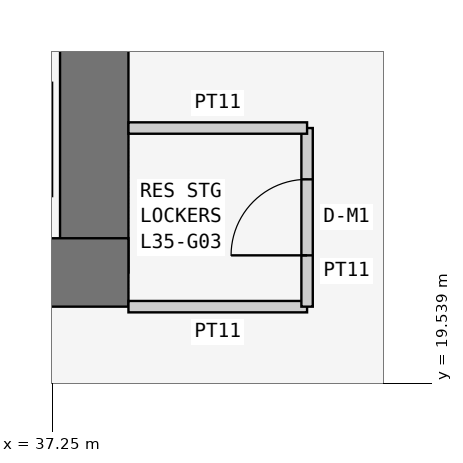
"""IFC4 building model, lengths in metres.
Left out: names, types, materials, properties, quantities, classifications, styles, units other than length and angle.
Written with IfcOpenShell. Run it as: python <this file> out.ifc"""

import sys

from ifc_helpers import new_model, si_unit, direction, frame, frame_2d, origin, place, context, subcontext, project, spatial, rectangle, extrude, element, fill, save


model = new_model("IFC4")
c1 = context("Model", 3, precision=1e-05, world=origin(), true_north=direction((0.0, 1.0)))
c2 = subcontext(c1, "Body", "Model", "MODEL_VIEW")
j1 = project(units=[si_unit("LENGTHUNIT", "METRE"), si_unit("PLANEANGLEUNIT", "RADIAN")], contexts=[c1])
p1 = place(None, origin())
s1 = spatial("IfcSite", under=j1, at=p1, CompositionType="ELEMENT")
p2 = place(p1, origin())
s2 = spatial("IfcBuilding", under=s1, at=p2, CompositionType="ELEMENT")
p3 = place(p2, frame((0.0, 0.0, 137.7)))
s3 = spatial("IfcBuildingStorey", under=s2, at=p3, CompositionType="ELEMENT", Elevation=137.7)
p4 = place(p3, frame((21.0, 21.0, 0.0), z_axis=(0.0, 0.0, 1.0), x_axis=(1.0, 0.0, 0.0)))
e1 = element("IfcWall", 1, at=p4, inside=s3, PredefinedType="SHEAR", context=c2, shape_type="SweptSolid", body=[
    extrude(rectangle(XDim=17.25, YDim=0.9, at=frame_2d((8.625, 0.0))), origin(), (0.0, 0.0, 1.0), 3.6),
])
p5 = place(p3, frame((37.8, 21.0, 0.0), z_axis=(0.0, 0.0, 1.0), x_axis=(0.0, 1.0, 0.0)))
e2 = element("IfcWall", 2, at=p5, inside=s3, PredefinedType="SHEAR", context=c2, shape_type="SweptSolid", body=[
    extrude(rectangle(XDim=17.25, YDim=0.9, at=frame_2d((8.625, 0.0))), origin(), (0.0, 0.0, 1.0), 3.6),
])
p6 = place(p5, frame((5.2, 0.0, 0.0)))
e3 = element("IfcOpeningElement", 3, at=p6, cuts=e2, PredefinedType="OPENING", context=c2, shape_type="SweptSolid", body=[
    extrude(rectangle(XDim=1.2, YDim=2.1, at=frame_2d((0.6, 1.05))), frame((0.0, 0.46, 0.0), z_axis=(0.0, -1.0, 0.0), x_axis=(1.0, 0.0, 0.0)), (0.0, 0.0, 1.0), 0.92),
])
p7 = place(p3, frame((38.25, 20.55, 0.0), z_axis=(0.0, 0.0, 1.0), x_axis=(1.0, 0.0, 0.0)))
e4 = element("IfcWall", 4, at=p7, inside=s3, PredefinedType="PARTITIONING", context=c2, shape_type="SweptSolid", body=[
    extrude(rectangle(XDim=2.35, YDim=0.15, at=frame_2d((1.175, 0.0))), origin(), (0.0, 0.0, 1.0), 3.45),
])
p8 = place(p3, frame((40.6, 20.55, 0.0), z_axis=(0.0, 0.0, 1.0), x_axis=(0.0, 1.0, 0.0)))
e5 = element("IfcWall", 5, at=p8, inside=s3, PredefinedType="PARTITIONING", context=c2, shape_type="SweptSolid", body=[
    extrude(rectangle(XDim=2.35, YDim=0.15, at=frame_2d((1.175, 0.0))), origin(), (0.0, 0.0, 1.0), 3.45),
])
p9 = place(p8, frame((0.675, 0.0, 0.0)))
e6 = element("IfcOpeningElement", 6, at=p9, cuts=e5, PredefinedType="OPENING", context=c2, shape_type="SweptSolid", body=[
    extrude(rectangle(XDim=1.0, YDim=2.1, at=frame_2d((0.5, 1.05))), frame((0.0, 0.085, 0.0), z_axis=(0.0, -1.0, 0.0), x_axis=(1.0, 0.0, 0.0)), (0.0, 0.0, 1.0), 0.17),
])
p10 = place(p3, frame((40.6, 22.9, 0.0), z_axis=(0.0, 0.0, 1.0), x_axis=(-1.0, 0.0, 0.0)))
e7 = element("IfcWall", 7, at=p10, inside=s3, PredefinedType="PARTITIONING", context=c2, shape_type="SweptSolid", body=[
    extrude(rectangle(XDim=2.35, YDim=0.15, at=frame_2d((1.175, 0.0))), origin(), (0.0, 0.0, 1.0), 3.45),
])
p11 = place(p9, origin())
e8 = element("IfcDoor", 8, at=p11, inside=s3, OperationType="SINGLE_SWING_LEFT", PredefinedType="DOOR", context=c2, shape_type="SweptSolid", body=[
    extrude(rectangle(XDim=1.0, YDim=2.1, at=frame_2d((0.5, 1.05))), frame((0.0, 0.025, 0.0), z_axis=(0.0, -1.0, 0.0), x_axis=(1.0, 0.0, 0.0)), (0.0, 0.0, 1.0), 0.05),
])
fill(e6, e8)
save(model, sys.argv[1])
